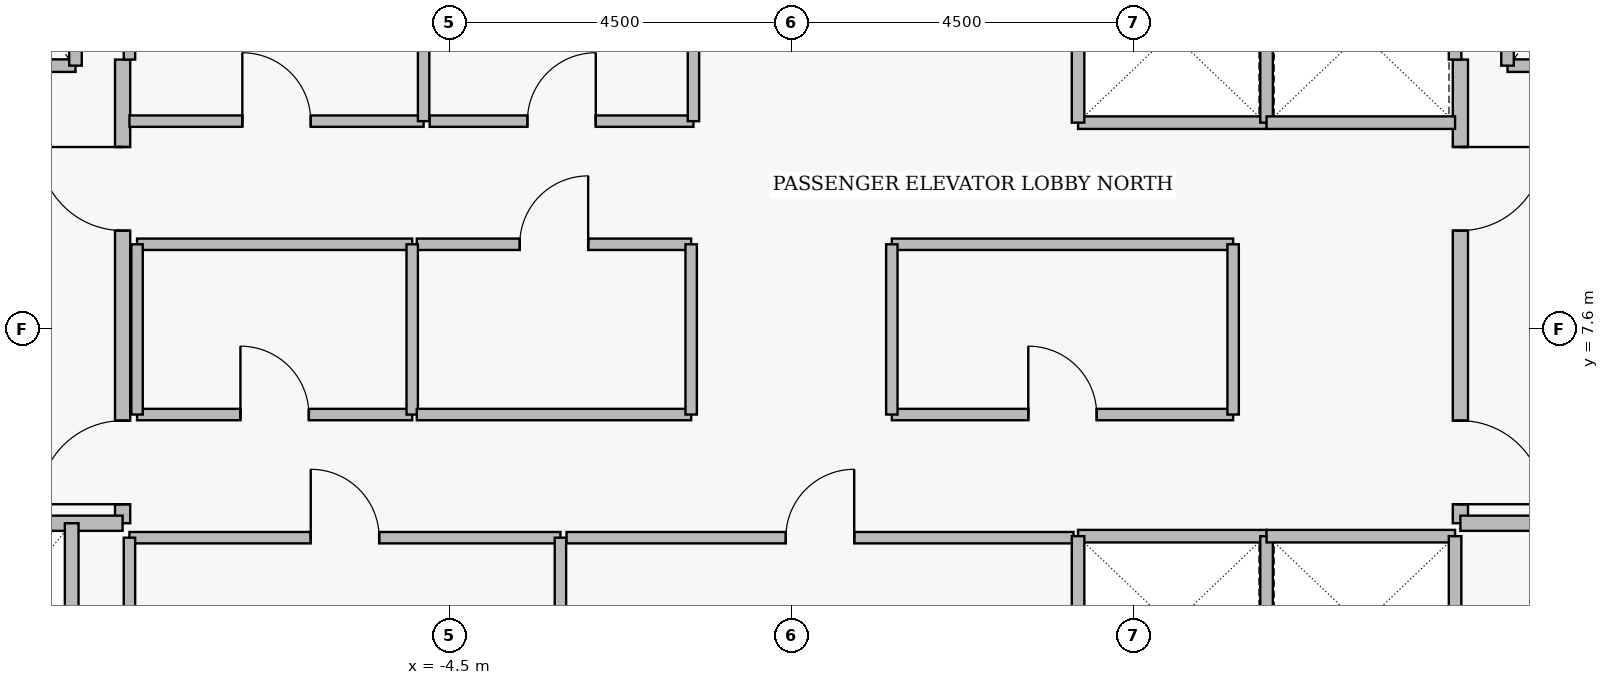
"""IFC4 building model, lengths in metres.
Left out: names, types, materials, properties, quantities, classifications, styles, units other than length and angle.
Written with IfcOpenShell. Run it as: python <this file> out.ifc"""

import sys

from ifc_helpers import new_model, si_unit, direction, frame, frame_2d, origin, place, context, subcontext, project, spatial, rectangle, extrude, element, fill, save


model = new_model("IFC4")
c1 = context("Model", 3, precision=1e-05, world=origin(), true_north=direction((0.0, 1.0)))
c2 = subcontext(c1, "Body", "Model", "MODEL_VIEW")
j1 = project(units=[si_unit("LENGTHUNIT", "METRE"), si_unit("PLANEANGLEUNIT", "RADIAN")], contexts=[c1])
p1 = place(None, origin())
s1 = spatial("IfcSite", under=j1, at=p1, CompositionType="ELEMENT")
p2 = place(p1, origin())
s2 = spatial("IfcBuilding", under=s1, at=p2, CompositionType="ELEMENT")
p3 = place(p2, frame((0.0, 0.0, 233.65)))
s3 = spatial("IfcBuildingStorey", under=s2, at=p3, CompositionType="ELEMENT", Elevation=233.65)
p4 = place(p3, frame((-8.8, 5.05, 0.0), z_axis=(0.0, 0.0, 1.0), x_axis=(0.0, 1.0, 0.0)))
e1 = element("IfcWall", 1, at=p4, inside=s3, PredefinedType="PARTITIONING", context=c2, shape_type="SweptSolid", body=[
    extrude(rectangle(XDim=6.1, YDim=0.2, at=frame_2d((3.05, 0.0))), origin(), (0.0, 0.0, 1.0), 5.74),
])
p5 = place(p4, frame((0.25, 0.0, 0.0)))
e2 = element("IfcOpeningElement", 2, at=p5, cuts=e1, PredefinedType="OPENING", context=c2, shape_type="SweptSolid", body=[
    extrude(rectangle(XDim=1.1, YDim=2.2, at=frame_2d((0.55, 1.1))), frame((0.0, 0.11, 0.0), z_axis=(0.0, -1.0, 0.0), x_axis=(1.0, 0.0, 0.0)), (0.0, 0.0, 1.0), 0.22),
])
p6 = place(p4, frame((3.85, 0.0, 0.0)))
e3 = element("IfcOpeningElement", 3, at=p6, cuts=e1, PredefinedType="OPENING", context=c2, shape_type="SweptSolid", body=[
    extrude(rectangle(XDim=1.1, YDim=2.2, at=frame_2d((0.55, 1.1))), frame((0.0, 0.11, 0.0), z_axis=(0.0, -1.0, 0.0), x_axis=(1.0, 0.0, 0.0)), (0.0, 0.0, 1.0), 0.22),
])
p7 = place(p3, frame((8.8, 11.15, 0.0), z_axis=(0.0, 0.0, 1.0), x_axis=(0.0, -1.0, 0.0)))
e4 = element("IfcWall", 4, at=p7, inside=s3, PredefinedType="PARTITIONING", context=c2, shape_type="SweptSolid", body=[
    extrude(rectangle(XDim=6.1, YDim=0.2, at=frame_2d((3.05, 0.0))), origin(), (0.0, 0.0, 1.0), 5.74),
])
p8 = place(p7, frame((1.15, 0.0, 0.0)))
e5 = element("IfcOpeningElement", 5, at=p8, cuts=e4, PredefinedType="OPENING", context=c2, shape_type="SweptSolid", body=[
    extrude(rectangle(XDim=1.1, YDim=2.2, at=frame_2d((0.55, 1.1))), frame((0.0, 0.11, 0.0), z_axis=(0.0, -1.0, 0.0), x_axis=(1.0, 0.0, 0.0)), (0.0, 0.0, 1.0), 0.22),
])
p9 = place(p7, frame((4.75, 0.0, 0.0)))
e6 = element("IfcOpeningElement", 6, at=p9, cuts=e4, PredefinedType="OPENING", context=c2, shape_type="SweptSolid", body=[
    extrude(rectangle(XDim=1.1, YDim=2.2, at=frame_2d((0.55, 1.1))), frame((0.0, 0.11, 0.0), z_axis=(0.0, -1.0, 0.0), x_axis=(1.0, 0.0, 0.0)), (0.0, 0.0, 1.0), 0.22),
])
p10 = place(p3, frame((-11.58, 11.07, 0.0), z_axis=(0.0, 0.0, 1.0), x_axis=(1.0, 0.0, 0.0)))
e7 = element("IfcWall", 7, at=p10, inside=s3, PredefinedType="PARTITIONING", context=c2, shape_type="SweptSolid", body=[
    extrude(rectangle(XDim=2.16, YDim=0.165, at=frame_2d((1.08, 0.0))), origin(), (0.0, 0.0, 1.0), 5.74),
])
p11 = place(p10, frame((0.53, 0.0, 0.0)))
e8 = element("IfcOpeningElement", 8, at=p11, cuts=e7, PredefinedType="OPENING", context=c2, shape_type="SweptSolid", body=[
    extrude(rectangle(XDim=1.15, YDim=2.25, at=frame_2d((0.575, 1.125))), frame((0.0, 0.093, 0.0), z_axis=(0.0, -1.0, 0.0), x_axis=(1.0, 0.0, 0.0)), (0.0, 0.0, 1.0), 0.185),
])
p12 = place(p3, frame((9.42, 11.07, 0.0), z_axis=(0.0, 0.0, 1.0), x_axis=(1.0, 0.0, 0.0)))
e9 = element("IfcWall", 9, at=p12, inside=s3, PredefinedType="PARTITIONING", context=c2, shape_type="SweptSolid", body=[
    extrude(rectangle(XDim=2.16, YDim=0.165, at=frame_2d((1.08, 0.0))), origin(), (0.0, 0.0, 1.0), 5.74),
])
p13 = place(p12, frame((0.53, 0.0, 0.0)))
e10 = element("IfcOpeningElement", 10, at=p13, cuts=e9, PredefinedType="OPENING", context=c2, shape_type="SweptSolid", body=[
    extrude(rectangle(XDim=1.15, YDim=2.25, at=frame_2d((0.575, 1.125))), frame((0.0, 0.093, 0.0), z_axis=(0.0, -1.0, 0.0), x_axis=(1.0, 0.0, 0.0)), (0.0, 0.0, 1.0), 0.185),
])
p14 = place(p3, frame((-8.71, 4.86, 0.0), z_axis=(0.0, 0.0, 1.0), x_axis=(1.0, 0.0, 0.0)))
e11 = element("IfcWall", 11, at=p14, inside=s3, PredefinedType="PARTITIONING", context=c2, shape_type="SweptSolid", body=[
    extrude(rectangle(XDim=5.67, YDim=0.15, at=frame_2d((2.835, 0.0))), origin(), (0.0, 0.0, 1.0), 5.74),
])
p15 = place(p14, frame((2.385, 0.0, 0.0)))
e12 = element("IfcOpeningElement", 12, at=p15, cuts=e11, PredefinedType="OPENING", context=c2, shape_type="SweptSolid", body=[
    extrude(rectangle(XDim=0.9, YDim=2.15, at=frame_2d((0.45, 1.075))), frame((0.0, 0.085, 0.0), z_axis=(0.0, -1.0, 0.0), x_axis=(1.0, 0.0, 0.0)), (0.0, 0.0, 1.0), 0.17),
])
p16 = place(p3, frame((-2.96, 4.86, 0.0), z_axis=(0.0, 0.0, 1.0), x_axis=(1.0, 0.0, 0.0)))
e13 = element("IfcWall", 13, at=p16, inside=s3, PredefinedType="PARTITIONING", context=c2, shape_type="SweptSolid", body=[
    extrude(rectangle(XDim=6.67, YDim=0.15, at=frame_2d((3.335, 0.0))), origin(), (0.0, 0.0, 1.0), 5.74),
])
p17 = place(p16, frame((2.885, 0.0, 0.0)))
e14 = element("IfcOpeningElement", 14, at=p17, cuts=e13, PredefinedType="OPENING", context=c2, shape_type="SweptSolid", body=[
    extrude(rectangle(XDim=0.9, YDim=2.15, at=frame_2d((0.45, 1.075))), frame((0.0, 0.085, 0.0), z_axis=(0.0, -1.0, 0.0), x_axis=(1.0, 0.0, 0.0)), (0.0, 0.0, 1.0), 0.17),
])
p18 = place(p3, frame((-8.71, 10.34, 0.0), z_axis=(0.0, 0.0, 1.0), x_axis=(1.0, 0.0, 0.0)))
e15 = element("IfcWall", 15, at=p18, inside=s3, PredefinedType="PARTITIONING", context=c2, shape_type="SweptSolid", body=[
    extrude(rectangle(XDim=3.87, YDim=0.15, at=frame_2d((1.935, 0.0))), origin(), (0.0, 0.0, 1.0), 5.74),
])
p19 = place(p18, frame((1.485, 0.0, 0.0)))
e16 = element("IfcOpeningElement", 16, at=p19, cuts=e15, PredefinedType="OPENING", context=c2, shape_type="SweptSolid", body=[
    extrude(rectangle(XDim=0.9, YDim=2.15, at=frame_2d((0.45, 1.075))), frame((0.0, 0.085, 0.0), z_axis=(0.0, -1.0, 0.0), x_axis=(1.0, 0.0, 0.0)), (0.0, 0.0, 1.0), 0.17),
])
p20 = place(p3, frame((-4.76, 10.34, 0.0), z_axis=(0.0, 0.0, 1.0), x_axis=(1.0, 0.0, 0.0)))
e17 = element("IfcWall", 17, at=p20, inside=s3, PredefinedType="PARTITIONING", context=c2, shape_type="SweptSolid", body=[
    extrude(rectangle(XDim=3.47, YDim=0.15, at=frame_2d((1.735, 0.0))), origin(), (0.0, 0.0, 1.0), 5.74),
])
p21 = place(p20, frame((1.285, 0.0, 0.0)))
e18 = element("IfcOpeningElement", 18, at=p21, cuts=e17, PredefinedType="OPENING", context=c2, shape_type="SweptSolid", body=[
    extrude(rectangle(XDim=0.9, YDim=2.15, at=frame_2d((0.45, 1.075))), frame((0.0, 0.085, 0.0), z_axis=(0.0, -1.0, 0.0), x_axis=(1.0, 0.0, 0.0)), (0.0, 0.0, 1.0), 0.17),
])
p22 = place(p3, frame((-8.61, 6.48, 0.0), z_axis=(0.0, 0.0, 1.0), x_axis=(1.0, 0.0, 0.0)))
e19 = element("IfcWall", 19, at=p22, inside=s3, PredefinedType="PARTITIONING", context=c2, shape_type="SweptSolid", body=[
    extrude(rectangle(XDim=3.62, YDim=0.15, at=frame_2d((1.81, 0.0))), origin(), (0.0, 0.0, 1.0), 5.74),
])
p23 = place(p22, frame((1.36, 0.0, 0.0)))
e20 = element("IfcOpeningElement", 20, at=p23, cuts=e19, PredefinedType="OPENING", context=c2, shape_type="SweptSolid", body=[
    extrude(rectangle(XDim=0.9, YDim=2.15, at=frame_2d((0.45, 1.075))), frame((0.0, 0.085, 0.0), z_axis=(0.0, -1.0, 0.0), x_axis=(1.0, 0.0, 0.0)), (0.0, 0.0, 1.0), 0.17),
])
p24 = place(p3, frame((-4.93, 8.72, 0.0), z_axis=(0.0, 0.0, 1.0), x_axis=(1.0, 0.0, 0.0)))
e21 = element("IfcWall", 21, at=p24, inside=s3, PredefinedType="PARTITIONING", context=c2, shape_type="SweptSolid", body=[
    extrude(rectangle(XDim=3.61, YDim=0.15, at=frame_2d((1.805, 0.0))), origin(), (0.0, 0.0, 1.0), 5.74),
])
p25 = place(p24, frame((1.355, 0.0, 0.0)))
e22 = element("IfcOpeningElement", 22, at=p25, cuts=e21, PredefinedType="OPENING", context=c2, shape_type="SweptSolid", body=[
    extrude(rectangle(XDim=0.9, YDim=2.15, at=frame_2d((0.45, 1.075))), frame((0.0, 0.085, 0.0), z_axis=(0.0, -1.0, 0.0), x_axis=(1.0, 0.0, 0.0)), (0.0, 0.0, 1.0), 0.17),
])
p26 = place(p3, frame((1.32, 6.48, 0.0), z_axis=(0.0, 0.0, 1.0), x_axis=(1.0, 0.0, 0.0)))
e23 = element("IfcWall", 23, at=p26, inside=s3, PredefinedType="PARTITIONING", context=c2, shape_type="SweptSolid", body=[
    extrude(rectangle(XDim=4.49, YDim=0.15, at=frame_2d((2.245, 0.0))), origin(), (0.0, 0.0, 1.0), 5.74),
])
p27 = place(p26, frame((1.795, 0.0, 0.0)))
e24 = element("IfcOpeningElement", 24, at=p27, cuts=e23, PredefinedType="OPENING", context=c2, shape_type="SweptSolid", body=[
    extrude(rectangle(XDim=0.9, YDim=2.15, at=frame_2d((0.45, 1.075))), frame((0.0, 0.085, 0.0), z_axis=(0.0, -1.0, 0.0), x_axis=(1.0, 0.0, 0.0)), (0.0, 0.0, 1.0), 0.17),
])
for number, where, z_axis, x_axis in (
    (25, (-11.65, 5.05, 0.0), (0.0, 0.0, 1.0), (1.0, 0.0, 0.0)),
    (26, (8.8, 5.05, 0.0), (0.0, 0.0, 1.0), (1.0, 0.0, 0.0)),
):
    element("IfcWall", number, at=place(p3, frame(where, z_axis=z_axis, x_axis=x_axis)), inside=s3, PredefinedType="PARTITIONING", context=c2, shape_type="SweptSolid", body=[
        extrude(rectangle(XDim=2.85, YDim=0.2, at=frame_2d((1.425, 0.0))), origin(), (0.0, 0.0, 1.0), 5.74),
    ])
for number, where, z_axis, x_axis in (
    (27, (-9.42, 11.07, 0.0), (0.0, 0.0, 1.0), (0.0, 1.0, 0.0)),
    (28, (9.42, 11.07, 0.0), (0.0, 0.0, 1.0), (0.0, 1.0, 0.0)),
):
    element("IfcWall", number, at=place(p3, frame(where, z_axis=z_axis, x_axis=x_axis)), inside=s3, PredefinedType="PARTITIONING", context=c2, shape_type="SweptSolid", body=[
        extrude(rectangle(XDim=2.96, YDim=0.165, at=frame_2d((1.48, 0.0))), origin(), (0.0, 0.0, 1.0), 5.74),
    ])
p28 = place(p3, frame((3.77, 4.88, 0.0), z_axis=(0.0, 0.0, 1.0), x_axis=(1.0, 0.0, 0.0)))
e29 = element("IfcWall", 29, at=p28, inside=s3, PredefinedType="PARTITIONING", context=c2, shape_type="SweptSolid", body=[
    extrude(rectangle(XDim=2.48, YDim=0.165, at=frame_2d((1.24, 0.0))), origin(), (0.0, 0.0, 1.0), 5.74),
])
for number, where, z_axis, x_axis in (
    (30, (3.77, 2.52, 0.0), (0.0, 0.0, 1.0), (0.0, 1.0, 0.0)),
    (31, (6.25, 2.52, 0.0), (0.0, 0.0, 1.0), (0.0, 1.0, 0.0)),
):
    element("IfcWall", number, at=place(p3, frame(where, z_axis=z_axis, x_axis=x_axis)), inside=s3, PredefinedType="PARTITIONING", context=c2, shape_type="SweptSolid", body=[
        extrude(rectangle(XDim=2.36, YDim=0.165, at=frame_2d((1.18, 0.0))), origin(), (0.0, 0.0, 1.0), 5.74),
    ])
p29 = place(p3, frame((6.25, 4.88, 0.0), z_axis=(0.0, 0.0, 1.0), x_axis=(1.0, 0.0, 0.0)))
e32 = element("IfcWall", 32, at=p29, inside=s3, PredefinedType="PARTITIONING", context=c2, shape_type="SweptSolid", body=[
    extrude(rectangle(XDim=2.48, YDim=0.165, at=frame_2d((1.24, 0.0))), origin(), (0.0, 0.0, 1.0), 5.74),
])
p30 = place(p3, frame((8.73, 2.52, 0.0), z_axis=(0.0, 0.0, 1.0), x_axis=(0.0, 1.0, 0.0)))
e33 = element("IfcWall", 33, at=p30, inside=s3, PredefinedType="PARTITIONING", context=c2, shape_type="SweptSolid", body=[
    extrude(rectangle(XDim=2.36, YDim=0.165, at=frame_2d((1.18, 0.0))), origin(), (0.0, 0.0, 1.0), 5.74),
])
p31 = place(p3, frame((3.77, 10.32, 0.0), z_axis=(0.0, 0.0, 1.0), x_axis=(1.0, 0.0, 0.0)))
e34 = element("IfcWall", 34, at=p31, inside=s3, PredefinedType="PARTITIONING", context=c2, shape_type="SweptSolid", body=[
    extrude(rectangle(XDim=2.48, YDim=0.165, at=frame_2d((1.24, 0.0))), origin(), (0.0, 0.0, 1.0), 5.74),
])
for number, where, z_axis, x_axis in (
    (35, (3.77, 10.32, 0.0), (0.0, 0.0, 1.0), (0.0, 1.0, 0.0)),
    (36, (6.25, 10.32, 0.0), (0.0, 0.0, 1.0), (0.0, 1.0, 0.0)),
):
    element("IfcWall", number, at=place(p3, frame(where, z_axis=z_axis, x_axis=x_axis)), inside=s3, PredefinedType="PARTITIONING", context=c2, shape_type="SweptSolid", body=[
        extrude(rectangle(XDim=2.36, YDim=0.165, at=frame_2d((1.18, 0.0))), origin(), (0.0, 0.0, 1.0), 5.74),
    ])
p32 = place(p3, frame((6.25, 10.32, 0.0), z_axis=(0.0, 0.0, 1.0), x_axis=(1.0, 0.0, 0.0)))
e37 = element("IfcWall", 37, at=p32, inside=s3, PredefinedType="PARTITIONING", context=c2, shape_type="SweptSolid", body=[
    extrude(rectangle(XDim=2.48, YDim=0.165, at=frame_2d((1.24, 0.0))), origin(), (0.0, 0.0, 1.0), 5.74),
])
p33 = place(p3, frame((8.73, 11.15, 0.0), z_axis=(0.0, 0.0, 1.0), x_axis=(0.0, 1.0, 0.0)))
e38 = element("IfcWall", 38, at=p33, inside=s3, PredefinedType="PARTITIONING", context=c2, shape_type="SweptSolid", body=[
    extrude(rectangle(XDim=1.53, YDim=0.165, at=frame_2d((0.765, 0.0))), origin(), (0.0, 0.0, 1.0), 5.74),
])
for number, where, z_axis, x_axis in (
    (39, (-8.71, 2.49, 0.0), (0.0, 0.0, 1.0), (0.0, 1.0, 0.0)),
    (40, (-3.04, 2.49, 0.0), (0.0, 0.0, 1.0), (0.0, 1.0, 0.0)),
):
    element("IfcWall", number, at=place(p3, frame(where, z_axis=z_axis, x_axis=x_axis)), inside=s3, PredefinedType="PARTITIONING", context=c2, shape_type="SweptSolid", body=[
        extrude(rectangle(XDim=2.37, YDim=0.15, at=frame_2d((1.185, 0.0))), origin(), (0.0, 0.0, 1.0), 5.74),
    ])
p34 = place(p3, frame((-8.71, 11.15, 0.0), z_axis=(0.0, 0.0, 1.0), x_axis=(0.0, 1.0, 0.0)))
e41 = element("IfcWall", 41, at=p34, inside=s3, PredefinedType="PARTITIONING", context=c2, shape_type="SweptSolid", body=[
    extrude(rectangle(XDim=1.71, YDim=0.15, at=frame_2d((0.855, 0.0))), origin(), (0.0, 0.0, 1.0), 5.74),
])
for number, where, z_axis, x_axis in (
    (42, (-4.84, 10.34, 0.0), (0.0, 0.0, 1.0), (0.0, 1.0, 0.0)),
    (43, (-1.29, 10.34, 0.0), (0.0, 0.0, 1.0), (0.0, 1.0, 0.0)),
):
    element("IfcWall", number, at=place(p3, frame(where, z_axis=z_axis, x_axis=x_axis)), inside=s3, PredefinedType="PARTITIONING", context=c2, shape_type="SweptSolid", body=[
        extrude(rectangle(XDim=2.52, YDim=0.15, at=frame_2d((1.26, 0.0))), origin(), (0.0, 0.0, 1.0), 5.74),
    ])
p35 = place(p3, frame((-9.47, 2.45, 0.0), z_axis=(0.0, 0.0, 1.0), x_axis=(0.0, 1.0, 0.0)))
e44 = element("IfcWall", 44, at=p35, inside=s3, PredefinedType="PARTITIONING", context=c2, shape_type="SweptSolid", body=[
    extrude(rectangle(XDim=2.6, YDim=0.18, at=frame_2d((1.3, 0.0))), origin(), (0.0, 0.0, 1.0), 5.74),
])
p36 = place(p3, frame((-8.61, 8.72, 0.0), z_axis=(0.0, 0.0, 1.0), x_axis=(1.0, 0.0, 0.0)))
e45 = element("IfcWall", 45, at=p36, inside=s3, PredefinedType="PARTITIONING", context=c2, shape_type="SweptSolid", body=[
    extrude(rectangle(XDim=3.62, YDim=0.15, at=frame_2d((1.81, 0.0))), origin(), (0.0, 0.0, 1.0), 5.74),
])
for number, where, z_axis, x_axis in (
    (46, (-8.61, 6.48, 0.0), (0.0, 0.0, 1.0), (0.0, 1.0, 0.0)),
    (47, (-4.99, 6.48, 0.0), (0.0, 0.0, 1.0), (0.0, 1.0, 0.0)),
):
    element("IfcWall", number, at=place(p3, frame(where, z_axis=z_axis, x_axis=x_axis)), inside=s3, PredefinedType="PARTITIONING", context=c2, shape_type="SweptSolid", body=[
        extrude(rectangle(XDim=2.24, YDim=0.15, at=frame_2d((1.12, 0.0))), origin(), (0.0, 0.0, 1.0), 5.74),
    ])
p37 = place(p3, frame((-4.93, 6.48, 0.0), z_axis=(0.0, 0.0, 1.0), x_axis=(1.0, 0.0, 0.0)))
e48 = element("IfcWall", 48, at=p37, inside=s3, PredefinedType="PARTITIONING", context=c2, shape_type="SweptSolid", body=[
    extrude(rectangle(XDim=3.61, YDim=0.15, at=frame_2d((1.805, 0.0))), origin(), (0.0, 0.0, 1.0), 5.74),
])
p38 = place(p3, frame((-1.32, 6.48, 0.0), z_axis=(0.0, 0.0, 1.0), x_axis=(0.0, 1.0, 0.0)))
e49 = element("IfcWall", 49, at=p38, inside=s3, PredefinedType="PARTITIONING", context=c2, shape_type="SweptSolid", body=[
    extrude(rectangle(XDim=2.24, YDim=0.15, at=frame_2d((1.12, 0.0))), origin(), (0.0, 0.0, 1.0), 5.74),
])
p39 = place(p3, frame((1.32, 8.72, 0.0), z_axis=(0.0, 0.0, 1.0), x_axis=(1.0, 0.0, 0.0)))
e50 = element("IfcWall", 50, at=p39, inside=s3, PredefinedType="PARTITIONING", context=c2, shape_type="SweptSolid", body=[
    extrude(rectangle(XDim=4.49, YDim=0.15, at=frame_2d((2.245, 0.0))), origin(), (0.0, 0.0, 1.0), 5.74),
])
for number, where, z_axis, x_axis in (
    (51, (1.32, 6.48, 0.0), (0.0, 0.0, 1.0), (0.0, 1.0, 0.0)),
    (52, (5.81, 6.48, 0.0), (0.0, 0.0, 1.0), (0.0, 1.0, 0.0)),
):
    element("IfcWall", number, at=place(p3, frame(where, z_axis=z_axis, x_axis=x_axis)), inside=s3, PredefinedType="PARTITIONING", context=c2, shape_type="SweptSolid", body=[
        extrude(rectangle(XDim=2.24, YDim=0.15, at=frame_2d((1.12, 0.0))), origin(), (0.0, 0.0, 1.0), 5.74),
    ])
p40 = place(p5, origin())
e53 = element("IfcDoor", 53, at=p40, inside=s3, OperationType="SINGLE_SWING_LEFT", PredefinedType="DOOR", context=c2, shape_type="SweptSolid", body=[
    extrude(rectangle(XDim=1.1, YDim=2.2, at=frame_2d((0.55, 1.1))), frame((0.0, 0.025, 0.0), z_axis=(0.0, -1.0, 0.0), x_axis=(1.0, 0.0, 0.0)), (0.0, 0.0, 1.0), 0.05),
])
fill(e2, e53)
p41 = place(p6, origin())
e54 = element("IfcDoor", 54, at=p41, inside=s3, OperationType="SINGLE_SWING_RIGHT", PredefinedType="DOOR", context=c2, shape_type="SweptSolid", body=[
    extrude(rectangle(XDim=1.1, YDim=2.2, at=frame_2d((0.55, 1.1))), frame((0.0, 0.025, 0.0), z_axis=(0.0, -1.0, 0.0), x_axis=(1.0, 0.0, 0.0)), (0.0, 0.0, 1.0), 0.05),
])
fill(e3, e54)
p42 = place(p8, origin())
e55 = element("IfcDoor", 55, at=p42, inside=s3, OperationType="SINGLE_SWING_LEFT", PredefinedType="DOOR", context=c2, shape_type="SweptSolid", body=[
    extrude(rectangle(XDim=1.1, YDim=2.2, at=frame_2d((0.55, 1.1))), frame((0.0, 0.025, 0.0), z_axis=(0.0, -1.0, 0.0), x_axis=(1.0, 0.0, 0.0)), (0.0, 0.0, 1.0), 0.05),
])
fill(e5, e55)
p43 = place(p9, origin())
e56 = element("IfcDoor", 56, at=p43, inside=s3, OperationType="SINGLE_SWING_RIGHT", PredefinedType="DOOR", context=c2, shape_type="SweptSolid", body=[
    extrude(rectangle(XDim=1.1, YDim=2.2, at=frame_2d((0.55, 1.1))), frame((0.0, 0.025, 0.0), z_axis=(0.0, -1.0, 0.0), x_axis=(1.0, 0.0, 0.0)), (0.0, 0.0, 1.0), 0.05),
])
fill(e6, e56)
p44 = place(p15, origin())
e57 = element("IfcDoor", 57, at=p44, inside=s3, OperationType="SINGLE_SWING_LEFT", PredefinedType="DOOR", context=c2, shape_type="SweptSolid", body=[
    extrude(rectangle(XDim=0.9, YDim=2.15, at=frame_2d((0.45, 1.075))), frame((0.0, 0.025, 0.0), z_axis=(0.0, -1.0, 0.0), x_axis=(1.0, 0.0, 0.0)), (0.0, 0.0, 1.0), 0.05),
])
fill(e12, e57)
p45 = place(p17, origin())
e58 = element("IfcDoor", 58, at=p45, inside=s3, OperationType="SINGLE_SWING_RIGHT", PredefinedType="DOOR", context=c2, shape_type="SweptSolid", body=[
    extrude(rectangle(XDim=0.9, YDim=2.15, at=frame_2d((0.45, 1.075))), frame((0.0, 0.025, 0.0), z_axis=(0.0, -1.0, 0.0), x_axis=(1.0, 0.0, 0.0)), (0.0, 0.0, 1.0), 0.05),
])
fill(e14, e58)
p46 = place(p19, origin())
e59 = element("IfcDoor", 59, at=p46, inside=s3, OperationType="SINGLE_SWING_LEFT", PredefinedType="DOOR", context=c2, shape_type="SweptSolid", body=[
    extrude(rectangle(XDim=0.9, YDim=2.15, at=frame_2d((0.45, 1.075))), frame((0.0, 0.025, 0.0), z_axis=(0.0, -1.0, 0.0), x_axis=(1.0, 0.0, 0.0)), (0.0, 0.0, 1.0), 0.05),
])
fill(e16, e59)
p47 = place(p21, origin())
e60 = element("IfcDoor", 60, at=p47, inside=s3, OperationType="SINGLE_SWING_RIGHT", PredefinedType="DOOR", context=c2, shape_type="SweptSolid", body=[
    extrude(rectangle(XDim=0.9, YDim=2.15, at=frame_2d((0.45, 1.075))), frame((0.0, 0.025, 0.0), z_axis=(0.0, -1.0, 0.0), x_axis=(1.0, 0.0, 0.0)), (0.0, 0.0, 1.0), 0.05),
])
fill(e18, e60)
p48 = place(p23, origin())
e61 = element("IfcDoor", 61, at=p48, inside=s3, OperationType="SINGLE_SWING_LEFT", PredefinedType="DOOR", context=c2, shape_type="SweptSolid", body=[
    extrude(rectangle(XDim=0.9, YDim=2.15, at=frame_2d((0.45, 1.075))), frame((0.0, 0.025, 0.0), z_axis=(0.0, -1.0, 0.0), x_axis=(1.0, 0.0, 0.0)), (0.0, 0.0, 1.0), 0.05),
])
fill(e20, e61)
p49 = place(p25, origin())
e62 = element("IfcDoor", 62, at=p49, inside=s3, OperationType="SINGLE_SWING_RIGHT", PredefinedType="DOOR", context=c2, shape_type="SweptSolid", body=[
    extrude(rectangle(XDim=0.9, YDim=2.15, at=frame_2d((0.45, 1.075))), frame((0.0, 0.025, 0.0), z_axis=(0.0, -1.0, 0.0), x_axis=(1.0, 0.0, 0.0)), (0.0, 0.0, 1.0), 0.05),
])
fill(e22, e62)
p50 = place(p27, origin())
e63 = element("IfcDoor", 63, at=p50, inside=s3, OperationType="SINGLE_SWING_LEFT", PredefinedType="DOOR", context=c2, shape_type="SweptSolid", body=[
    extrude(rectangle(XDim=0.9, YDim=2.15, at=frame_2d((0.45, 1.075))), frame((0.0, 0.025, 0.0), z_axis=(0.0, -1.0, 0.0), x_axis=(1.0, 0.0, 0.0)), (0.0, 0.0, 1.0), 0.05),
])
fill(e24, e63)
save(model, sys.argv[1])
